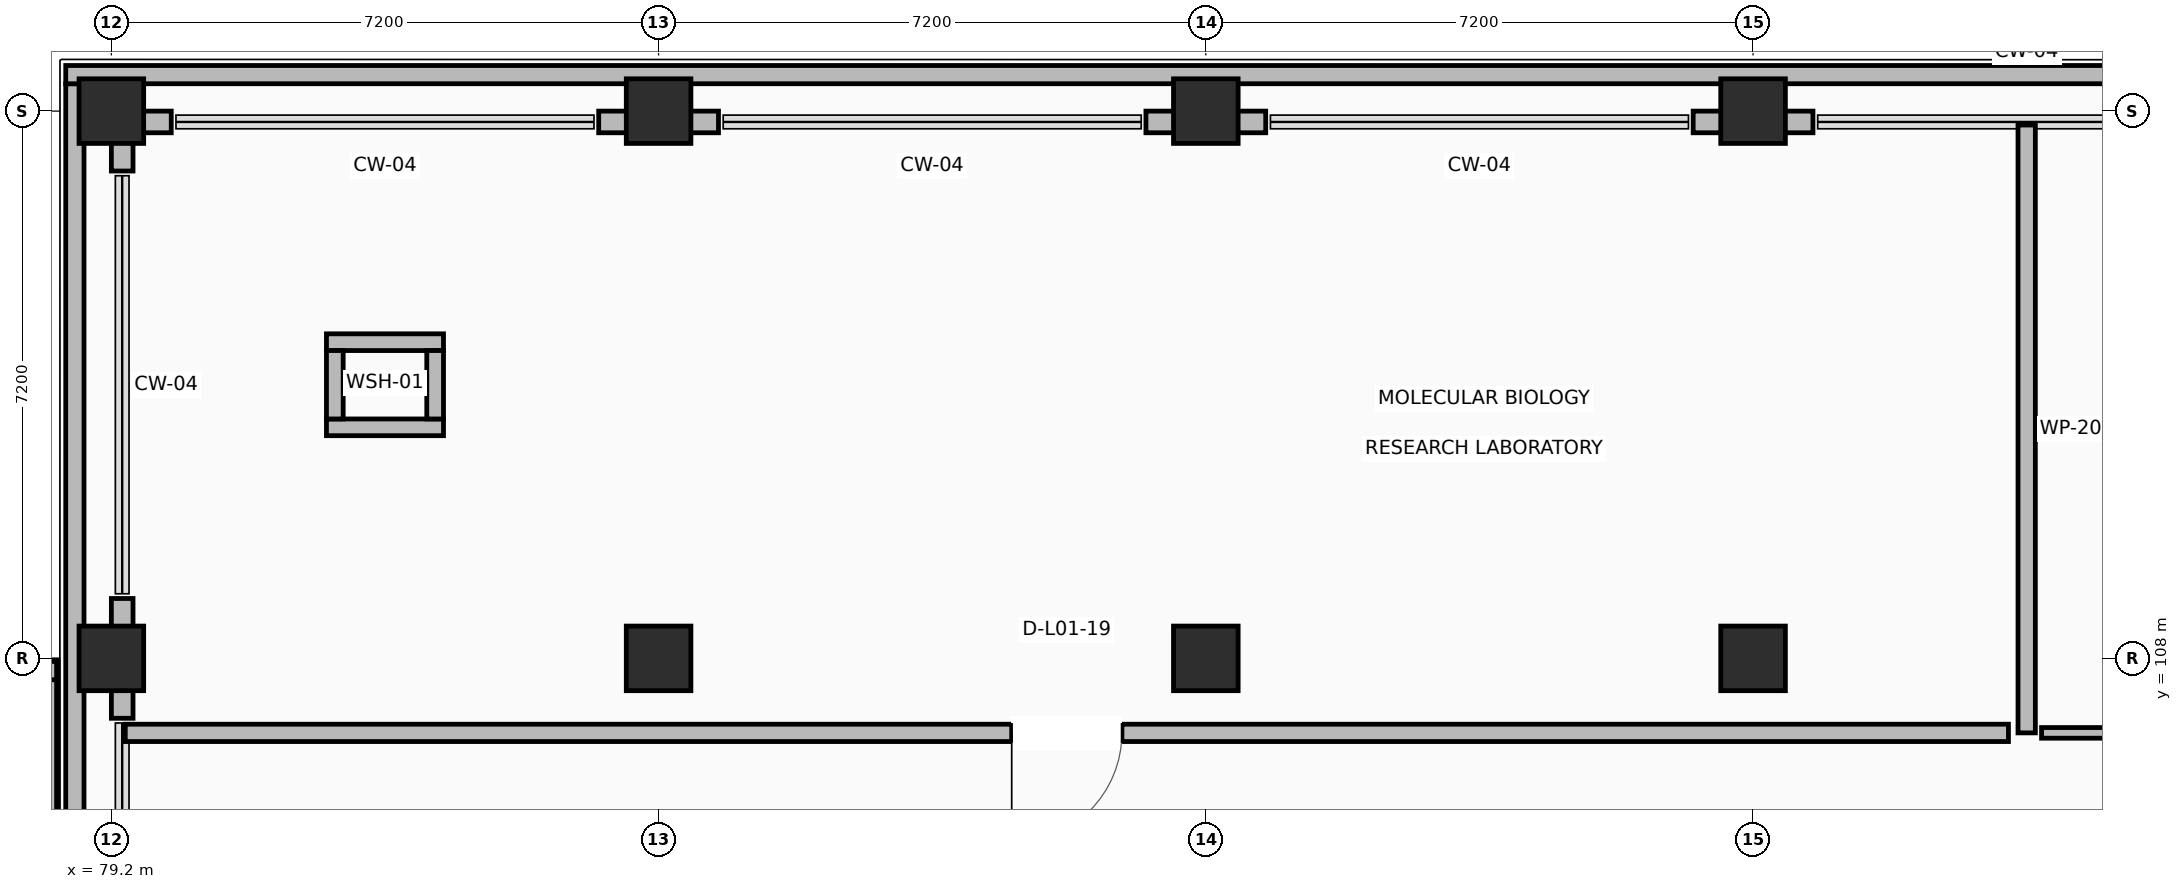
"""IFC4 building model, lengths in metres.
Left out: names, types, materials, properties, quantities, classifications, styles, units other than length and angle.
Written with IfcOpenShell. Run it as: python <this file> out.ifc"""

import sys

from ifc_helpers import new_model, si_unit, direction, frame, frame_2d, origin, origin_2d, place, context, subcontext, project, spatial, rectangle, extrude, element, fill, save


model = new_model("IFC4")
c1 = context("Model", 3, precision=1e-05, world=origin(), true_north=direction((0.0, 1.0)))
c2 = subcontext(c1, "Body", "Model", "MODEL_VIEW")
j1 = project(units=[si_unit("LENGTHUNIT", "METRE"), si_unit("PLANEANGLEUNIT", "RADIAN")], contexts=[c1])
p1 = place(None, origin())
s1 = spatial("IfcSite", under=j1, at=p1, CompositionType="ELEMENT")
p2 = place(p1, origin())
s2 = spatial("IfcBuilding", under=s1, at=p2, CompositionType="ELEMENT")
p3 = place(p2, frame((0.0, 0.0, 4.5)))
s3 = spatial("IfcBuildingStorey", under=s2, at=p3, CompositionType="ELEMENT", Elevation=4.5)
for number, where, z_axis, x_axis in (
    (1, (79.2, 108.0, 0.0), (0.0, 0.0, 1.0), (1.0, 0.0, 0.0)),
    (2, (79.2, 115.2, 0.0), (0.0, 0.0, 1.0), (1.0, 0.0, 0.0)),
    (3, (86.4, 108.0, 0.0), (0.0, 0.0, 1.0), (1.0, 0.0, 0.0)),
    (4, (86.4, 115.2, 0.0), (0.0, 0.0, 1.0), (1.0, 0.0, 0.0)),
    (5, (93.6, 108.0, 0.0), (0.0, 0.0, 1.0), (1.0, 0.0, 0.0)),
    (6, (93.6, 115.2, 0.0), (0.0, 0.0, 1.0), (1.0, 0.0, 0.0)),
    (7, (100.8, 108.0, 0.0), (0.0, 0.0, 1.0), (1.0, 0.0, 0.0)),
    (8, (100.8, 115.2, 0.0), (0.0, 0.0, 1.0), (1.0, 0.0, 0.0)),
):
    element("IfcColumn", number, at=place(p3, frame(where, z_axis=z_axis, x_axis=x_axis)), inside=s3, PredefinedType="COLUMN", context=c2, shape_type="SweptSolid", body=[
        extrude(rectangle(XDim=0.85, YDim=0.85, at=origin_2d()), origin(), (0.0, 0.0, 1.0), 4.22),
    ])
for number, where, z_axis, x_axis in (
    (9, (101.588, 115.058, 0.0), (0.0, 0.0, 1.0), (-1.0, 0.0, 0.0)),
    (10, (94.388, 115.058, 0.0), (0.0, 0.0, 1.0), (-1.0, 0.0, 0.0)),
    (11, (87.188, 115.058, 0.0), (0.0, 0.0, 1.0), (-1.0, 0.0, 0.0)),
):
    element("IfcWall", number, at=place(p3, frame(where, z_axis=z_axis, x_axis=x_axis)), inside=s3, PredefinedType="STANDARD", context=c2, shape_type="SweptSolid", body=[
        extrude(rectangle(XDim=1.576, YDim=0.285, at=frame_2d((0.788, 0.0))), origin(), (0.0, 0.0, 1.0), 3.26),
    ])
p4 = place(p3, frame((79.988, 115.058, 0.0), z_axis=(0.0, 0.0, 1.0), x_axis=(-1.0, 0.0, 0.0)))
e12 = element("IfcWall", 12, at=p4, inside=s3, PredefinedType="STANDARD", context=c2, shape_type="SweptSolid", body=[
    extrude(rectangle(XDim=0.788, YDim=0.285, at=frame_2d((0.394, 0.0))), origin(), (0.0, 0.0, 1.0), 3.26),
])
p5 = place(p3, frame((79.343, 114.915, 0.0), z_axis=(0.0, 0.0, 1.0), x_axis=(0.0, -1.0, 0.0)))
e13 = element("IfcWall", 13, at=p5, inside=s3, PredefinedType="STANDARD", context=c2, shape_type="SweptSolid", body=[
    extrude(rectangle(XDim=0.503, YDim=0.285, at=frame_2d((0.251, 0.0))), origin(), (0.0, 0.0, 1.0), 3.26),
])
p6 = place(p3, frame((79.343, 108.788, 0.0), z_axis=(0.0, 0.0, 1.0), x_axis=(0.0, -1.0, 0.0)))
e14 = element("IfcWall", 14, at=p6, inside=s3, PredefinedType="STANDARD", context=c2, shape_type="SweptSolid", body=[
    extrude(rectangle(XDim=1.576, YDim=0.285, at=frame_2d((0.788, 0.0))), origin(), (0.0, 0.0, 1.0), 3.26),
])
p7 = place(p3, frame((78.72, 93.24, 0.0), z_axis=(0.0, 0.0, 1.0), x_axis=(0.0, 1.0, 0.0)))
e15 = element("IfcWall", 15, at=p7, inside=s3, PredefinedType="PARAPET", context=c2, shape_type="SweptSolid", body=[
    extrude(rectangle(XDim=22.32, YDim=0.24, at=frame_2d((11.16, 0.0))), origin(), (0.0, 0.0, 1.0), 1.12),
])
p8 = place(p3, frame((78.6, 115.68, 0.0), z_axis=(0.0, 0.0, 1.0), x_axis=(1.0, 0.0, 0.0)))
e16 = element("IfcWall", 16, at=p8, inside=s3, PredefinedType="PARAPET", context=c2, shape_type="SweptSolid", body=[
    extrude(rectangle(XDim=73.2, YDim=0.24, at=frame_2d((36.6, 0.0))), origin(), (0.0, 0.0, 1.0), 1.12),
])
p9 = place(p3, frame((78.36, 107.72, 0.0), z_axis=(0.0, 0.0, 1.0), x_axis=(0.0, -1.0, 0.0)))
e17 = element("IfcWall", 17, at=p9, inside=s3, PredefinedType="PARAPET", context=c2, shape_type="SweptSolid", body=[
    extrude(rectangle(XDim=13.84, YDim=0.24, at=frame_2d((6.92, 0.0))), origin(), (0.0, 0.0, 1.0), 1.12),
])
p10 = place(p3, frame((50.44, 107.84, 0.0), z_axis=(0.0, 0.0, 1.0), x_axis=(1.0, 0.0, 0.0)))
e18 = element("IfcWall", 18, at=p10, inside=s3, PredefinedType="PARAPET", context=c2, shape_type="SweptSolid", body=[
    extrude(rectangle(XDim=28.04, YDim=0.24, at=frame_2d((14.02, 0.0))), origin(), (0.0, 0.0, 1.0), 1.12),
])
for number, where, z_axis, x_axis in (
    (19, (82.03, 111.04, 0.0), (0.0, 0.0, 1.0), (1.0, 0.0, 0.0)),
    (20, (82.03, 112.16, 0.0), (0.0, 0.0, 1.0), (1.0, 0.0, 0.0)),
):
    element("IfcWall", number, at=place(p3, frame(where, z_axis=z_axis, x_axis=x_axis)), inside=s3, PredefinedType="STANDARD", context=c2, shape_type="SweptSolid", body=[
        extrude(rectangle(XDim=1.54, YDim=0.22, at=frame_2d((0.77, 0.0))), origin(), (0.0, 0.0, 1.0), 3.26),
    ])
for number, where, z_axis, x_axis in (
    (21, (82.14, 111.15, 0.0), (0.0, 0.0, 1.0), (0.0, 1.0, 0.0)),
    (22, (83.46, 111.15, 0.0), (0.0, 0.0, 1.0), (0.0, 1.0, 0.0)),
):
    element("IfcWall", number, at=place(p3, frame(where, z_axis=z_axis, x_axis=x_axis)), inside=s3, PredefinedType="STANDARD", context=c2, shape_type="SweptSolid", body=[
        extrude(rectangle(XDim=0.9, YDim=0.22, at=frame_2d((0.45, 0.0))), origin(), (0.0, 0.0, 1.0), 3.26),
    ])
p11 = place(p3, frame((104.4, 115.017, 0.0), z_axis=(0.0, 0.0, 1.0), x_axis=(0.0, -1.0, 0.0)))
e23 = element("IfcWall", 23, at=p11, inside=s3, PredefinedType="PARTITIONING", context=c2, shape_type="SweptSolid", body=[
    extrude(rectangle(XDim=7.997, YDim=0.228, at=frame_2d((3.999, 0.0))), origin(), (0.0, 0.0, 1.0), 3.26),
])
p12 = place(p3, frame((104.16, 107.02, 0.0), z_axis=(0.0, 0.0, 1.0), x_axis=(-1.0, 0.0, 0.0)))
e24 = element("IfcWall", 24, at=p12, inside=s3, PredefinedType="PARTITIONING", context=c2, shape_type="SweptSolid", body=[
    extrude(rectangle(XDim=24.777, YDim=0.228, at=frame_2d((12.388, 0.0))), origin(), (0.0, 0.0, 1.0), 3.26),
])
p13 = place(p12, frame((11.664, 0.0, 0.0)))
e25 = element("IfcOpeningElement", 25, at=p13, cuts=e24, PredefinedType="OPENING", context=c2, shape_type="SweptSolid", body=[
    extrude(rectangle(XDim=1.45, YDim=2.2, at=frame_2d((0.725, 1.1))), frame((0.0, 0.124, 0.0), z_axis=(0.0, -1.0, 0.0), x_axis=(1.0, 0.0, 0.0)), (0.0, 0.0, 1.0), 0.248),
])
p14 = place(p3, frame((125.848, 107.02, 0.0), z_axis=(0.0, 0.0, 1.0), x_axis=(-1.0, 0.0, 0.0)))
e26 = element("IfcWall", 26, at=p14, inside=s3, PredefinedType="PARTITIONING", context=c2, shape_type="SweptSolid", body=[
    extrude(rectangle(XDim=21.252, YDim=0.14, at=frame_2d((10.626, 0.0))), origin(), (0.0, 0.0, 1.0), 3.26),
])
p15 = place(p14, frame((11.201, 0.0, 0.0)))
e27 = element("IfcOpeningElement", 27, at=p15, cuts=e26, PredefinedType="OPENING", context=c2, shape_type="SweptSolid", body=[
    extrude(rectangle(XDim=0.95, YDim=2.1, at=frame_2d((0.475, 1.05))), frame((0.0, 0.08, 0.0), z_axis=(0.0, -1.0, 0.0), x_axis=(1.0, 0.0, 0.0)), (0.0, 0.0, 1.0), 0.16),
])
p16 = place(p13, origin())
e28 = element("IfcDoor", 28, at=p16, inside=s3, OperationType="SINGLE_SWING_RIGHT", PredefinedType="DOOR", context=c2, shape_type="SweptSolid", body=[
    extrude(rectangle(XDim=1.45, YDim=2.2, at=frame_2d((0.725, 1.1))), frame((0.0, 0.025, 0.0), z_axis=(0.0, -1.0, 0.0), x_axis=(1.0, 0.0, 0.0)), (0.0, 0.0, 1.0), 0.05),
])
fill(e25, e28)
save(model, sys.argv[1])
